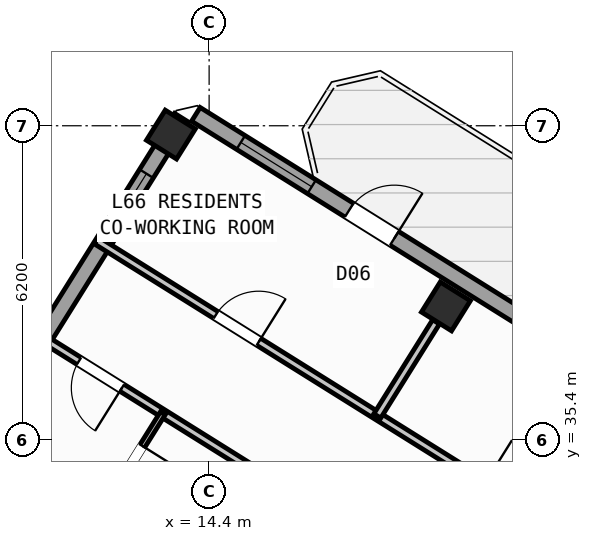
"""IFC4 building model, lengths in metres.
Left out: names, types, materials, properties, quantities, classifications, styles, units other than length and angle.
Written with IfcOpenShell. Run it as: python <this file> out.ifc"""

import sys

from ifc_helpers import new_model, si_unit, direction, frame, frame_2d, origin, origin_2d, place, context, subcontext, project, spatial, rectangle, hollow_rectangle, extrude, source, transform, mapped, element, fill, save


model = new_model("IFC4")
c1 = context("Model", 3, precision=1e-05, world=origin(), true_north=direction((0.0, 1.0)))
c2 = subcontext(c1, "Body", "Model", "MODEL_VIEW")
j1 = project(units=[si_unit("LENGTHUNIT", "METRE"), si_unit("PLANEANGLEUNIT", "RADIAN")], contexts=[c1])
p1 = place(None, origin())
s1 = spatial("IfcSite", under=j1, at=p1, CompositionType="ELEMENT")
p2 = place(p1, origin())
s2 = spatial("IfcBuilding", under=s1, at=p2, CompositionType="ELEMENT")
p3 = place(p2, frame((0.0, 0.0, 262.8)))
s3 = spatial("IfcBuildingStorey", under=s2, at=p3, CompositionType="ELEMENT", Elevation=262.8)
m1 = source(origin(), c2, "Body", "SweptSolid", [
    extrude(hollow_rectangle(XDim=0.7, YDim=0.7, WallThickness=0.028, at=origin_2d()), origin(), (0.0, 0.0, 1.0), 3.6),
])
for number, where, z_axis, x_axis in (
    (1, (19.073, 38.034, 0.0), (0.0, 0.0, 1.0), (-0.848, 0.53, 0.0)),
    (2, (13.646, 41.426, 0.0), (0.0, 0.0, 1.0), (-0.848, 0.53, 0.0)),
):
    element("IfcColumn", number, at=place(p3, frame(where, z_axis=z_axis, x_axis=x_axis)), inside=s3, PredefinedType="COLUMN", context=c2, shape_type="MappedRepresentation", body=[
        mapped(m1, transform((0.0, 0.0, 0.0), scale=1.0)),
    ])
p4 = place(p3, frame((2.415, 23.452, 0.0), z_axis=(0.0, 0.0, 1.0), x_axis=(0.52991049553, 0.848053575387, 0.0)))
e3 = element("IfcWall", 3, at=p4, inside=s3, PredefinedType="STANDARD", context=c2, shape_type="SweptSolid", body=[
    extrude(rectangle(XDim=21.587, YDim=0.32, at=frame_2d((10.794, 0.0))), origin(), (0.0, 0.0, 1.0), 2.875),
])
p5 = place(p4, frame((2.606, 0.0, 0.9)))
e4 = element("IfcOpeningElement", 4, at=p5, cuts=e3, PredefinedType="OPENING", context=c2, shape_type="SweptSolid", body=[
    extrude(rectangle(XDim=1.65, YDim=1.45, at=frame_2d((0.825, 0.725))), frame((0.0, 0.17, 0.0), z_axis=(0.0, -1.0, 0.0), x_axis=(1.0, 0.0, 0.0)), (0.0, 0.0, 1.0), 0.34),
])
p6 = place(p4, frame((8.094, 0.0, 0.9)))
e5 = element("IfcOpeningElement", 5, at=p6, cuts=e3, PredefinedType="OPENING", context=c2, shape_type="SweptSolid", body=[
    extrude(rectangle(XDim=1.35, YDim=1.45, at=frame_2d((0.675, 0.725))), frame((0.0, 0.17, 0.0), z_axis=(0.0, -1.0, 0.0), x_axis=(1.0, 0.0, 0.0)), (0.0, 0.0, 1.0), 0.34),
])
p7 = place(p4, frame((11.044, 0.0, 0.9)))
e6 = element("IfcOpeningElement", 6, at=p7, cuts=e3, PredefinedType="OPENING", context=c2, shape_type="SweptSolid", body=[
    extrude(rectangle(XDim=1.35, YDim=1.45, at=frame_2d((0.675, 0.725))), frame((0.0, 0.17, 0.0), z_axis=(0.0, -1.0, 0.0), x_axis=(1.0, 0.0, 0.0)), (0.0, 0.0, 1.0), 0.34),
])
p8 = place(p4, frame((14.804, 0.0, 1.0)))
e7 = element("IfcOpeningElement", 7, at=p8, cuts=e3, PredefinedType="OPENING", context=c2, shape_type="SweptSolid", body=[
    extrude(rectangle(XDim=0.9, YDim=1.25, at=frame_2d((0.45, 0.625))), frame((0.0, 0.17, 0.0), z_axis=(0.0, -1.0, 0.0), x_axis=(1.0, 0.0, 0.0)), (0.0, 0.0, 1.0), 0.34),
])
p9 = place(p4, frame((19.384, 0.0, 1.0)))
e8 = element("IfcOpeningElement", 8, at=p9, cuts=e3, PredefinedType="OPENING", context=c2, shape_type="SweptSolid", body=[
    extrude(rectangle(XDim=0.9, YDim=1.25, at=frame_2d((0.45, 0.625))), frame((0.0, 0.17, 0.0), z_axis=(0.0, -1.0, 0.0), x_axis=(1.0, 0.0, 0.0)), (0.0, 0.0, 1.0), 0.34),
])
p10 = place(p3, frame((14.138, 41.825, 0.0), z_axis=(0.0, 0.0, 1.0), x_axis=(0.848046498049, -0.529921821731, 0.0)))
e9 = element("IfcWall", 9, at=p10, inside=s3, PredefinedType="STANDARD", context=c2, shape_type="SweptSolid", body=[
    extrude(rectangle(XDim=31.588, YDim=0.32, at=frame_2d((15.794, 0.0))), origin(), (0.0, 0.0, 1.0), 3.35),
])
p11 = place(p10, frame((3.568, 0.0, 0.0)))
e10 = element("IfcOpeningElement", 10, at=p11, cuts=e9, PredefinedType="OPENING", context=c2, shape_type="SweptSolid", body=[
    extrude(rectangle(XDim=1.05, YDim=2.15, at=frame_2d((0.525, 1.075))), frame((0.0, 0.17, 0.0), z_axis=(0.0, -1.0, 0.0), x_axis=(1.0, 0.0, 0.0)), (0.0, 0.0, 1.0), 0.34),
])
p12 = place(p10, frame((1.046, 0.0, 0.9)))
e11 = element("IfcOpeningElement", 11, at=p12, cuts=e9, PredefinedType="OPENING", context=c2, shape_type="SweptSolid", body=[
    extrude(rectangle(XDim=1.65, YDim=1.45, at=frame_2d((0.825, 0.725))), frame((0.0, 0.17, 0.0), z_axis=(0.0, -1.0, 0.0), x_axis=(1.0, 0.0, 0.0)), (0.0, 0.0, 1.0), 0.34),
])
p13 = place(p10, frame((8.61, 0.0, 0.9)))
e12 = element("IfcOpeningElement", 12, at=p13, cuts=e9, PredefinedType="OPENING", context=c2, shape_type="SweptSolid", body=[
    extrude(rectangle(XDim=1.35, YDim=1.45, at=frame_2d((0.675, 0.725))), frame((0.0, 0.17, 0.0), z_axis=(0.0, -1.0, 0.0), x_axis=(1.0, 0.0, 0.0)), (0.0, 0.0, 1.0), 0.34),
])
p14 = place(p10, frame((13.599, 0.0, 0.95)))
e13 = element("IfcOpeningElement", 13, at=p14, cuts=e9, PredefinedType="OPENING", context=c2, shape_type="SweptSolid", body=[
    extrude(rectangle(XDim=1.95, YDim=1.35, at=frame_2d((0.975, 0.675))), frame((0.0, 0.17, 0.0), z_axis=(0.0, -1.0, 0.0), x_axis=(1.0, 0.0, 0.0)), (0.0, 0.0, 1.0), 0.34),
])
p15 = place(p10, frame((17.154, 0.0, 1.0)))
e14 = element("IfcOpeningElement", 14, at=p15, cuts=e9, PredefinedType="OPENING", context=c2, shape_type="SweptSolid", body=[
    extrude(rectangle(XDim=0.9, YDim=1.25, at=frame_2d((0.45, 0.625))), frame((0.0, 0.17, 0.0), z_axis=(0.0, -1.0, 0.0), x_axis=(1.0, 0.0, 0.0)), (0.0, 0.0, 1.0), 0.34),
])
p16 = place(p10, frame((21.719, 0.0, 0.9)))
e15 = element("IfcOpeningElement", 15, at=p16, cuts=e9, PredefinedType="OPENING", context=c2, shape_type="SweptSolid", body=[
    extrude(rectangle(XDim=1.65, YDim=1.45, at=frame_2d((0.825, 0.725))), frame((0.0, 0.17, 0.0), z_axis=(0.0, -1.0, 0.0), x_axis=(1.0, 0.0, 0.0)), (0.0, 0.0, 1.0), 0.34),
])
p17 = place(p10, frame((27.419, 0.0, 0.9)))
e16 = element("IfcOpeningElement", 16, at=p17, cuts=e9, PredefinedType="OPENING", context=c2, shape_type="SweptSolid", body=[
    extrude(rectangle(XDim=1.65, YDim=1.45, at=frame_2d((0.825, 0.725))), frame((0.0, 0.17, 0.0), z_axis=(0.0, -1.0, 0.0), x_axis=(1.0, 0.0, 0.0)), (0.0, 0.0, 1.0), 0.34),
])
p18 = place(p3, frame((26.363, 30.472, 0.0), z_axis=(0.0, 0.0, 1.0), x_axis=(-0.848052408131, 0.529912363569, 0.0)))
e17 = element("IfcWall", 17, at=p18, inside=s3, PredefinedType="PARTITIONING", context=c2, shape_type="SweptSolid", body=[
    extrude(rectangle(XDim=16.73, YDim=0.16, at=frame_2d((8.365, 0.0))), origin(), (0.0, 0.0, 1.0), 3.34),
])
p19 = place(p18, frame((1.588, 0.0, 0.0)))
e18 = element("IfcOpeningElement", 18, at=p19, cuts=e17, PredefinedType="OPENING", context=c2, shape_type="SweptSolid", body=[
    extrude(rectangle(XDim=1.0, YDim=2.1, at=frame_2d((0.5, 1.05))), frame((0.0, 0.09, 0.0), z_axis=(0.0, -1.0, 0.0), x_axis=(1.0, 0.0, 0.0)), (0.0, 0.0, 1.0), 0.18),
])
p20 = place(p18, frame((6.685, 0.0, 0.0)))
e19 = element("IfcOpeningElement", 19, at=p20, cuts=e17, PredefinedType="OPENING", context=c2, shape_type="SweptSolid", body=[
    extrude(rectangle(XDim=1.0, YDim=2.1, at=frame_2d((0.5, 1.05))), frame((0.0, 0.09, 0.0), z_axis=(0.0, -1.0, 0.0), x_axis=(1.0, 0.0, 0.0)), (0.0, 0.0, 1.0), 0.18),
])
p21 = place(p18, frame((12.951, 0.0, 0.0)))
e20 = element("IfcOpeningElement", 20, at=p21, cuts=e17, PredefinedType="OPENING", context=c2, shape_type="SweptSolid", body=[
    extrude(rectangle(XDim=1.0, YDim=2.1, at=frame_2d((0.5, 1.05))), frame((0.0, 0.09, 0.0), z_axis=(0.0, -1.0, 0.0), x_axis=(1.0, 0.0, 0.0)), (0.0, 0.0, 1.0), 0.18),
])
p22 = place(p3, frame((25.198, 28.606, 0.0), z_axis=(0.0, 0.0, 1.0), x_axis=(-0.848052408131, 0.529912363569, 0.0)))
e21 = element("IfcWall", 21, at=p22, inside=s3, PredefinedType="PARTITIONING", context=c2, shape_type="SweptSolid", body=[
    extrude(rectangle(XDim=16.73, YDim=0.16, at=frame_2d((8.365, 0.0))), origin(), (0.0, 0.0, 1.0), 3.34),
])
p23 = place(p22, frame((1.395, 0.0, 0.0)))
e22 = element("IfcOpeningElement", 22, at=p23, cuts=e21, PredefinedType="OPENING", context=c2, shape_type="SweptSolid", body=[
    extrude(rectangle(XDim=1.0, YDim=2.1, at=frame_2d((0.5, 1.05))), frame((0.0, 0.09, 0.0), z_axis=(0.0, -1.0, 0.0), x_axis=(1.0, 0.0, 0.0)), (0.0, 0.0, 1.0), 0.18),
])
p24 = place(p22, frame((7.82, 0.0, 0.0)))
e23 = element("IfcOpeningElement", 23, at=p24, cuts=e21, PredefinedType="OPENING", context=c2, shape_type="SweptSolid", body=[
    extrude(rectangle(XDim=1.0, YDim=2.1, at=frame_2d((0.5, 1.05))), frame((0.0, 0.09, 0.0), z_axis=(0.0, -1.0, 0.0), x_axis=(1.0, 0.0, 0.0)), (0.0, 0.0, 1.0), 0.18),
])
p25 = place(p22, frame((14.76, 0.0, 0.0)))
e24 = element("IfcOpeningElement", 24, at=p25, cuts=e21, PredefinedType="OPENING", context=c2, shape_type="SweptSolid", body=[
    extrude(rectangle(XDim=1.0, YDim=2.1, at=frame_2d((0.5, 1.05))), frame((0.0, 0.09, 0.0), z_axis=(0.0, -1.0, 0.0), x_axis=(1.0, 0.0, 0.0)), (0.0, 0.0, 1.0), 0.18),
])
p26 = place(p3, frame((13.486, 35.924, 0.0), z_axis=(0.0, 0.0, 1.0), x_axis=(-0.529920421309, -0.848047373134, 0.0)))
e25 = element("IfcWall", 25, at=p26, inside=s3, PredefinedType="PARTITIONING", context=c2, shape_type="SweptSolid", body=[
    extrude(rectangle(XDim=16.77, YDim=0.11, at=frame_2d((8.385, 0.0))), origin(), (0.0, 0.0, 1.0), 3.34),
])
p27 = place(p26, frame((0.76, 0.0, 0.0)))
e26 = element("IfcOpeningElement", 26, at=p27, cuts=e25, PredefinedType="OPENING", context=c2, shape_type="SweptSolid", body=[
    extrude(rectangle(XDim=0.78, YDim=2.05, at=frame_2d((0.39, 1.025))), frame((0.0, 0.065, 0.0), z_axis=(0.0, -1.0, 0.0), x_axis=(1.0, 0.0, 0.0)), (0.0, 0.0, 1.0), 0.13),
])
p28 = place(p26, frame((5.967, 0.0, 0.0)))
e27 = element("IfcOpeningElement", 27, at=p28, cuts=e25, PredefinedType="OPENING", context=c2, shape_type="SweptSolid", body=[
    extrude(rectangle(XDim=0.92, YDim=2.08, at=frame_2d((0.46, 1.04))), frame((0.0, 0.065, 0.0), z_axis=(0.0, -1.0, 0.0), x_axis=(1.0, 0.0, 0.0)), (0.0, 0.0, 1.0), 0.13),
])
p29 = place(p3, frame((12.214, 33.889, 0.0), z_axis=(0.0, 0.0, 1.0), x_axis=(-0.848060696325, 0.529899099216, 0.0)))
e28 = element("IfcWall", 28, at=p29, inside=s3, PredefinedType="PLUMBINGWALL", context=c2, shape_type="SweptSolid", body=[
    extrude(rectangle(XDim=2.418, YDim=0.14, at=frame_2d((1.209, 0.0))), origin(), (0.0, 0.0, 1.0), 2.875),
])
p30 = place(p29, frame((0.99, 0.0, 0.0)))
e29 = element("IfcOpeningElement", 29, at=p30, cuts=e28, PredefinedType="OPENING", context=c2, shape_type="SweptSolid", body=[
    extrude(rectangle(XDim=0.92, YDim=2.08, at=frame_2d((0.46, 1.04))), frame((0.0, 0.08, 0.0), z_axis=(0.0, -1.0, 0.0), x_axis=(1.0, 0.0, 0.0)), (0.0, 0.0, 1.0), 0.16),
])
p31 = place(p3, frame((18.879, 37.729, 0.0), z_axis=(0.0, 0.0, 1.0), x_axis=(-0.52994879608, -0.848029641896, 0.0)))
e30 = element("IfcWall", 30, at=p31, inside=s3, PredefinedType="PARTITIONING", context=c2, shape_type="SweptSolid", body=[
    extrude(rectangle(XDim=2.188, YDim=0.16, at=frame_2d((1.094, 0.0))), origin(), (0.0, 0.0, 1.0), 2.875),
])
m2 = source(origin(), c2, "Body", "SweptSolid", [
    extrude(rectangle(XDim=1.05, YDim=2.15, at=frame_2d((0.525, 1.075))), frame((0.0, 0.025, 0.0), z_axis=(0.0, -1.0, 0.0), x_axis=(1.0, 0.0, 0.0)), (0.0, 0.0, 1.0), 0.05),
])
p32 = place(p11, origin())
e31 = element("IfcDoor", 31, at=p32, inside=s3, OperationType="SINGLE_SWING_RIGHT", PredefinedType="DOOR", context=c2, shape_type="MappedRepresentation", body=[
    mapped(m2, transform((0.0, 0.0, 0.0), scale=1.0)),
])
fill(e10, e31)
m3 = source(origin(), c2, "Body", "SweptSolid", [
    extrude(rectangle(XDim=0.9, YDim=1.25, at=frame_2d((0.45, 0.625))), frame((0.0, 0.03, 0.0), z_axis=(0.0, -1.0, 0.0), x_axis=(1.0, 0.0, 0.0)), (0.0, 0.0, 1.0), 0.06),
])
p33 = place(p9, origin())
e32 = element("IfcWindow", 32, at=p33, inside=s3, PartitioningType="SINGLE_PANEL", PredefinedType="WINDOW", context=c2, shape_type="MappedRepresentation", body=[
    mapped(m3, transform((0.0, 0.0, 0.0), scale=1.0)),
])
fill(e8, e32)
m4 = source(origin(), c2, "Body", "SweptSolid", [
    extrude(rectangle(XDim=1.65, YDim=1.45, at=frame_2d((0.825, 0.725))), frame((0.0, 0.03, 0.0), z_axis=(0.0, -1.0, 0.0), x_axis=(1.0, 0.0, 0.0)), (0.0, 0.0, 1.0), 0.06),
])
p34 = place(p12, origin())
e33 = element("IfcWindow", 33, at=p34, inside=s3, PartitioningType="SINGLE_PANEL", PredefinedType="WINDOW", context=c2, shape_type="MappedRepresentation", body=[
    mapped(m4, transform((0.0, 0.0, 0.0), scale=1.0)),
])
fill(e11, e33)
m5 = source(origin(), c2, "Body", "SweptSolid", [
    extrude(rectangle(XDim=1.0, YDim=2.1, at=frame_2d((0.5, 1.05))), frame((0.0, 0.025, 0.0), z_axis=(0.0, -1.0, 0.0), x_axis=(1.0, 0.0, 0.0)), (0.0, 0.0, 1.0), 0.05),
])
p35 = place(p25, origin())
e34 = element("IfcDoor", 34, at=p35, inside=s3, OperationType="SINGLE_SWING_LEFT", PredefinedType="DOOR", context=c2, shape_type="MappedRepresentation", body=[
    mapped(m5, transform((0.0, 0.0, 0.0), scale=1.0)),
])
fill(e24, e34)
m6 = source(origin(), c2, "Body", "SweptSolid", [
    extrude(rectangle(XDim=0.78, YDim=2.05, at=frame_2d((0.39, 1.025))), frame((0.0, 0.025, 0.0), z_axis=(0.0, -1.0, 0.0), x_axis=(1.0, 0.0, 0.0)), (0.0, 0.0, 1.0), 0.05),
])
p36 = place(p27, origin())
e35 = element("IfcDoor", 35, at=p36, inside=s3, OperationType="SINGLE_SWING_LEFT", PredefinedType="DOOR", context=c2, shape_type="MappedRepresentation", body=[
    mapped(m6, transform((0.0, 0.0, 0.0), scale=1.0)),
])
fill(e26, e35)
p37 = place(p21, frame((1.0, 0.0, 0.0), z_axis=(0.0, 0.0, 1.0), x_axis=(-1.0, 0.0, 0.0)))
e36 = element("IfcDoor", 36, at=p37, inside=s3, OperationType="SINGLE_SWING_RIGHT", PredefinedType="DOOR", context=c2, shape_type="MappedRepresentation", body=[
    mapped(m5, transform((0.0, 0.0, 0.0), scale=1.0)),
])
fill(e20, e36)
save(model, sys.argv[1])
